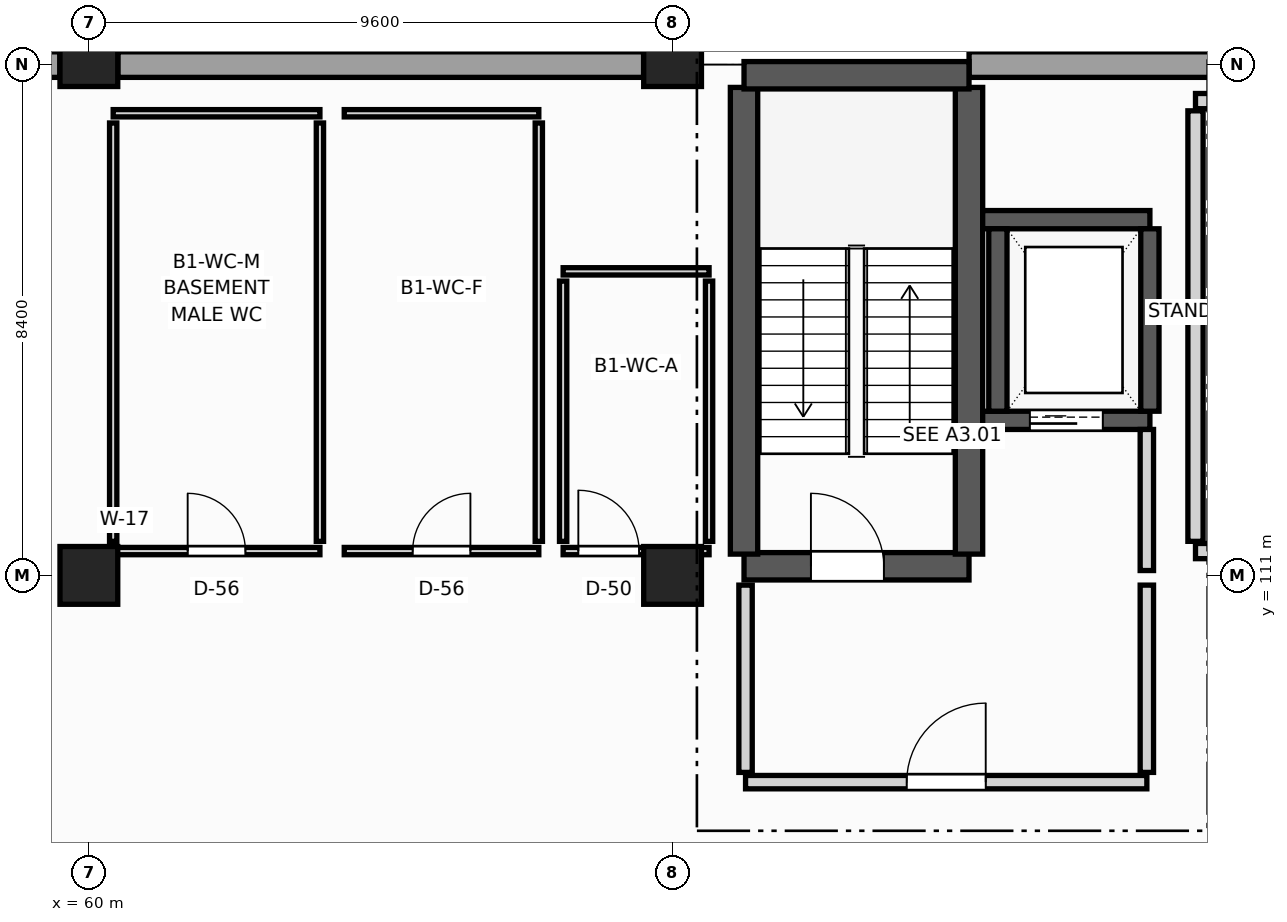
"""IFC4 building model, lengths in metres.
Left out: names, types, materials, properties, quantities, classifications, styles, units other than length and angle.
Written with IfcOpenShell. Run it as: python <this file> out.ifc"""

import sys

from ifc_helpers import new_model, si_unit, direction, frame, frame_2d, origin, origin_2d, place, context, subcontext, project, spatial, rectangle, extrude, element, fill, save


model = new_model("IFC4")
c1 = context("Model", 3, precision=1e-05, world=origin(), true_north=direction((0.0, 1.0)))
c2 = subcontext(c1, "Body", "Model", "MODEL_VIEW")
j1 = project(units=[si_unit("LENGTHUNIT", "METRE"), si_unit("PLANEANGLEUNIT", "RADIAN")], contexts=[c1])
p1 = place(None, origin())
s1 = spatial("IfcSite", under=j1, at=p1, CompositionType="ELEMENT")
p2 = place(p1, origin())
s2 = spatial("IfcBuilding", under=s1, at=p2, CompositionType="ELEMENT")
p3 = place(p2, frame((0.0, 0.0, -4.5)))
s3 = spatial("IfcBuildingStorey", under=s2, at=p3, CompositionType="ELEMENT", Elevation=-4.5)
p4 = place(p3, frame((60.0, 111.0, 0.0), z_axis=(0.0, 0.0, 1.0), x_axis=(1.0, 0.0, 0.0)))
e1 = element("IfcColumn", 1, at=p4, inside=s3, PredefinedType="COLUMN", context=c2, shape_type="SweptSolid", body=[
    extrude(rectangle(XDim=0.95, YDim=0.95, at=origin_2d()), origin(), (0.0, 0.0, 1.0), 4.14),
])
p5 = place(p3, frame((60.0, 119.4, 0.0), z_axis=(0.0, 0.0, 1.0), x_axis=(1.0, 0.0, 0.0)))
e2 = element("IfcColumn", 2, at=p5, inside=s3, PredefinedType="COLUMN", context=c2, shape_type="SweptSolid", body=[
    extrude(rectangle(XDim=0.95, YDim=0.72, at=origin_2d()), origin(), (0.0, 0.0, 1.0), 4.14),
])
p6 = place(p3, frame((69.6, 111.0, 0.0), z_axis=(0.0, 0.0, 1.0), x_axis=(1.0, 0.0, 0.0)))
e3 = element("IfcColumn", 3, at=p6, inside=s3, PredefinedType="COLUMN", context=c2, shape_type="SweptSolid", body=[
    extrude(rectangle(XDim=0.95, YDim=0.95, at=origin_2d()), origin(), (0.0, 0.0, 1.0), 4.14),
])
p7 = place(p3, frame((69.6, 119.4, 0.0), z_axis=(0.0, 0.0, 1.0), x_axis=(1.0, 0.0, 0.0)))
e4 = element("IfcColumn", 4, at=p7, inside=s3, PredefinedType="COLUMN", context=c2, shape_type="SweptSolid", body=[
    extrude(rectangle(XDim=0.95, YDim=0.72, at=origin_2d()), origin(), (0.0, 0.0, 1.0), 4.14),
])
for number, where, z_axis, x_axis in (
    (5, (50.877, 119.4, 0.0), (0.0, 0.0, 1.0), (1.0, 0.0, 0.0)),
    (6, (60.477, 119.4, 0.0), (0.0, 0.0, 1.0), (1.0, 0.0, 0.0)),
):
    element("IfcWall", number, at=place(p3, frame(where, z_axis=z_axis, x_axis=x_axis)), inside=s3, PredefinedType="SOLIDWALL", context=c2, shape_type="SweptSolid", body=[
        extrude(rectangle(XDim=8.646, YDim=0.42, at=frame_2d((4.323, 0.0))), origin(), (0.0, 0.0, 1.0), 4.135),
    ])
p8 = place(p3, frame((74.476, 119.4, 0.0), z_axis=(0.0, 0.0, 1.0), x_axis=(1.0, 0.0, 0.0)))
e7 = element("IfcWall", 7, at=p8, inside=s3, PredefinedType="SOLIDWALL", context=c2, shape_type="SweptSolid", body=[
    extrude(rectangle(XDim=4.247, YDim=0.42, at=frame_2d((2.124, 0.0))), origin(), (0.0, 0.0, 1.0), 4.135),
])
p9 = place(p3, frame((70.775, 111.15, 0.0), z_axis=(0.0, 0.0, 1.0), x_axis=(1.0, 0.0, 0.0)))
e8 = element("IfcWall", 8, at=p9, inside=s3, PredefinedType="SHEAR", context=c2, shape_type="SweptSolid", body=[
    extrude(rectangle(XDim=3.7, YDim=0.45, at=frame_2d((1.85, 0.0))), origin(), (0.0, 0.0, 1.0), 4.14),
])
p10 = place(p9, frame((1.1, 0.0, 0.0)))
e9 = element("IfcOpeningElement", 9, at=p10, cuts=e8, PredefinedType="OPENING", context=c2, shape_type="SweptSolid", body=[
    extrude(rectangle(XDim=1.2, YDim=2.2, at=frame_2d((0.6, 1.1))), frame((0.0, 0.235, 0.0), z_axis=(0.0, -1.0, 0.0), x_axis=(1.0, 0.0, 0.0)), (0.0, 0.0, 1.0), 0.47),
])
for number, where, z_axis, x_axis in (
    (10, (70.775, 111.35, 0.0), (0.0, 0.0, 1.0), (0.0, 1.0, 0.0)),
    (11, (74.475, 111.35, 0.0), (0.0, 0.0, 1.0), (0.0, 1.0, 0.0)),
):
    element("IfcWall", number, at=place(p3, frame(where, z_axis=z_axis, x_axis=x_axis)), inside=s3, PredefinedType="SHEAR", context=c2, shape_type="SweptSolid", body=[
        extrude(rectangle(XDim=7.675, YDim=0.45, at=frame_2d((3.837, 0.0))), origin(), (0.0, 0.0, 1.0), 4.14),
    ])
p11 = place(p3, frame((70.775, 119.225, 0.0), z_axis=(0.0, 0.0, 1.0), x_axis=(1.0, 0.0, 0.0)))
e12 = element("IfcWall", 12, at=p11, inside=s3, PredefinedType="SHEAR", context=c2, shape_type="SweptSolid", body=[
    extrude(rectangle(XDim=3.7, YDim=0.45, at=frame_2d((1.85, 0.0))), origin(), (0.0, 0.0, 1.0), 4.14),
])
p12 = place(p3, frame((74.7, 113.55, 0.0), z_axis=(0.0, 0.0, 1.0), x_axis=(1.0, 0.0, 0.0)))
e13 = element("IfcWall", 13, at=p12, inside=s3, PredefinedType="SHEAR", context=c2, shape_type="SweptSolid", body=[
    extrude(rectangle(XDim=2.75, YDim=0.3, at=frame_2d((1.375, 0.0))), origin(), (0.0, 0.0, 1.0), 4.14),
])
p13 = place(p12, frame((0.775, 0.0, 0.0)))
e14 = element("IfcOpeningElement", 14, at=p13, cuts=e13, PredefinedType="OPENING", context=c2, shape_type="SweptSolid", body=[
    extrude(rectangle(XDim=1.2, YDim=2.2, at=frame_2d((0.6, 1.1))), frame((0.0, 0.16, 0.0), z_axis=(0.0, -1.0, 0.0), x_axis=(1.0, 0.0, 0.0)), (0.0, 0.0, 1.0), 0.32),
])
p14 = place(p3, frame((74.7, 116.85, 0.0), z_axis=(0.0, 0.0, 1.0), x_axis=(1.0, 0.0, 0.0)))
e15 = element("IfcWall", 15, at=p14, inside=s3, PredefinedType="SHEAR", context=c2, shape_type="SweptSolid", body=[
    extrude(rectangle(XDim=2.75, YDim=0.3, at=frame_2d((1.375, 0.0))), origin(), (0.0, 0.0, 1.0), 4.14),
])
for number, where, z_axis, x_axis in (
    (16, (74.95, 113.7, 0.0), (0.0, 0.0, 1.0), (0.0, 1.0, 0.0)),
    (17, (77.45, 113.7, 0.0), (0.0, 0.0, 1.0), (0.0, 1.0, 0.0)),
):
    element("IfcWall", number, at=place(p3, frame(where, z_axis=z_axis, x_axis=x_axis)), inside=s3, PredefinedType="SHEAR", context=c2, shape_type="SweptSolid", body=[
        extrude(rectangle(XDim=3.0, YDim=0.3, at=frame_2d((1.5, 0.0))), origin(), (0.0, 0.0, 1.0), 4.14),
    ])
p15 = place(p3, frame((70.8, 107.6, 0.0), z_axis=(0.0, 0.0, 1.0), x_axis=(1.0, 0.0, 0.0)))
e18 = element("IfcWall", 18, at=p15, inside=s3, PredefinedType="PARTITIONING", context=c2, shape_type="SweptSolid", body=[
    extrude(rectangle(XDim=6.6, YDim=0.22, at=frame_2d((3.3, 0.0))), origin(), (0.0, 0.0, 1.0), 3.22),
])
p16 = place(p15, frame((2.65, 0.0, 0.0)))
e19 = element("IfcOpeningElement", 19, at=p16, cuts=e18, PredefinedType="OPENING", context=c2, shape_type="SweptSolid", body=[
    extrude(rectangle(XDim=1.3, YDim=2.2, at=frame_2d((0.65, 1.1))), frame((0.0, 0.12, 0.0), z_axis=(0.0, -1.0, 0.0), x_axis=(1.0, 0.0, 0.0)), (0.0, 0.0, 1.0), 0.24),
])
p17 = place(p3, frame((77.4, 111.08, 0.0), z_axis=(0.0, 0.0, 1.0), x_axis=(0.0, 1.0, 0.0)))
e20 = element("IfcWall", 20, at=p17, inside=s3, PredefinedType="PARTITIONING", context=c2, shape_type="SweptSolid", body=[
    extrude(rectangle(XDim=2.32, YDim=0.22, at=frame_2d((1.16, 0.0))), origin(), (0.0, 0.0, 1.0), 3.22),
])
for number, where, z_axis, x_axis in (
    (21, (70.8, 107.76, 0.0), (0.0, 0.0, 1.0), (0.0, 1.0, 0.0)),
    (22, (77.4, 107.76, 0.0), (0.0, 0.0, 1.0), (0.0, 1.0, 0.0)),
):
    element("IfcWall", number, at=place(p3, frame(where, z_axis=z_axis, x_axis=x_axis)), inside=s3, PredefinedType="PARTITIONING", context=c2, shape_type="SweptSolid", body=[
        extrude(rectangle(XDim=3.08, YDim=0.22, at=frame_2d((1.54, 0.0))), origin(), (0.0, 0.0, 1.0), 3.22),
    ])
p18 = place(p3, frame((78.2, 111.4, 0.0), z_axis=(0.0, 0.0, 1.0), x_axis=(1.0, 0.0, 0.0)))
e23 = element("IfcWall", 23, at=p18, inside=s3, PredefinedType="PARTITIONING", context=c2, shape_type="SweptSolid", body=[
    extrude(rectangle(XDim=12.4, YDim=0.25, at=frame_2d((6.2, 0.0))), origin(), (0.0, 0.0, 1.0), 3.22),
])
p19 = place(p18, frame((5.4, 0.0, 0.0)))
e24 = element("IfcOpeningElement", 24, at=p19, cuts=e23, PredefinedType="OPENING", context=c2, shape_type="SweptSolid", body=[
    extrude(rectangle(XDim=1.6, YDim=2.3, at=frame_2d((0.8, 1.15))), frame((0.0, 0.135, 0.0), z_axis=(0.0, -1.0, 0.0), x_axis=(1.0, 0.0, 0.0)), (0.0, 0.0, 1.0), 0.27),
])
p20 = place(p3, frame((78.2, 118.8, 0.0), z_axis=(0.0, 0.0, 1.0), x_axis=(1.0, 0.0, 0.0)))
e25 = element("IfcWall", 25, at=p20, inside=s3, PredefinedType="PARTITIONING", context=c2, shape_type="SweptSolid", body=[
    extrude(rectangle(XDim=12.4, YDim=0.25, at=frame_2d((6.2, 0.0))), origin(), (0.0, 0.0, 1.0), 3.22),
])
p21 = place(p3, frame((78.2, 111.56, 0.0), z_axis=(0.0, 0.0, 1.0), x_axis=(0.0, 1.0, 0.0)))
e26 = element("IfcWall", 26, at=p21, inside=s3, PredefinedType="PARTITIONING", context=c2, shape_type="SweptSolid", body=[
    extrude(rectangle(XDim=7.08, YDim=0.25, at=frame_2d((3.54, 0.0))), origin(), (0.0, 0.0, 1.0), 3.22),
])
p22 = place(p3, frame((60.4, 111.4, 0.0), z_axis=(0.0, 0.0, 1.0), x_axis=(1.0, 0.0, 0.0)))
e27 = element("IfcWall", 27, at=p22, inside=s3, PredefinedType="PARTITIONING", context=c2, shape_type="SweptSolid", body=[
    extrude(rectangle(XDim=3.4, YDim=0.12, at=frame_2d((1.7, 0.0))), origin(), (0.0, 0.0, 1.0), 3.22),
])
p23 = place(p22, frame((1.225, 0.0, 0.0)))
e28 = element("IfcOpeningElement", 28, at=p23, cuts=e27, PredefinedType="OPENING", context=c2, shape_type="SweptSolid", body=[
    extrude(rectangle(XDim=0.95, YDim=2.1, at=frame_2d((0.475, 1.05))), frame((0.0, 0.07, 0.0), z_axis=(0.0, -1.0, 0.0), x_axis=(1.0, 0.0, 0.0)), (0.0, 0.0, 1.0), 0.14),
])
p24 = place(p3, frame((60.4, 118.6, 0.0), z_axis=(0.0, 0.0, 1.0), x_axis=(1.0, 0.0, 0.0)))
e29 = element("IfcWall", 29, at=p24, inside=s3, PredefinedType="PARTITIONING", context=c2, shape_type="SweptSolid", body=[
    extrude(rectangle(XDim=3.4, YDim=0.12, at=frame_2d((1.7, 0.0))), origin(), (0.0, 0.0, 1.0), 3.22),
])
for number, where, z_axis, x_axis in (
    (30, (60.4, 111.56, 0.0), (0.0, 0.0, 1.0), (0.0, 1.0, 0.0)),
    (31, (63.8, 111.56, 0.0), (0.0, 0.0, 1.0), (0.0, 1.0, 0.0)),
):
    element("IfcWall", number, at=place(p3, frame(where, z_axis=z_axis, x_axis=x_axis)), inside=s3, PredefinedType="PARTITIONING", context=c2, shape_type="SweptSolid", body=[
        extrude(rectangle(XDim=6.88, YDim=0.12, at=frame_2d((3.44, 0.0))), origin(), (0.0, 0.0, 1.0), 3.22),
    ])
p25 = place(p3, frame((64.2, 111.4, 0.0), z_axis=(0.0, 0.0, 1.0), x_axis=(1.0, 0.0, 0.0)))
e32 = element("IfcWall", 32, at=p25, inside=s3, PredefinedType="PARTITIONING", context=c2, shape_type="SweptSolid", body=[
    extrude(rectangle(XDim=3.2, YDim=0.12, at=frame_2d((1.6, 0.0))), origin(), (0.0, 0.0, 1.0), 3.22),
])
p26 = place(p25, frame((1.125, 0.0, 0.0)))
e33 = element("IfcOpeningElement", 33, at=p26, cuts=e32, PredefinedType="OPENING", context=c2, shape_type="SweptSolid", body=[
    extrude(rectangle(XDim=0.95, YDim=2.1, at=frame_2d((0.475, 1.05))), frame((0.0, 0.07, 0.0), z_axis=(0.0, -1.0, 0.0), x_axis=(1.0, 0.0, 0.0)), (0.0, 0.0, 1.0), 0.14),
])
p27 = place(p3, frame((64.2, 118.6, 0.0), z_axis=(0.0, 0.0, 1.0), x_axis=(1.0, 0.0, 0.0)))
e34 = element("IfcWall", 34, at=p27, inside=s3, PredefinedType="PARTITIONING", context=c2, shape_type="SweptSolid", body=[
    extrude(rectangle(XDim=3.2, YDim=0.12, at=frame_2d((1.6, 0.0))), origin(), (0.0, 0.0, 1.0), 3.22),
])
p28 = place(p3, frame((67.4, 111.56, 0.0), z_axis=(0.0, 0.0, 1.0), x_axis=(0.0, 1.0, 0.0)))
e35 = element("IfcWall", 35, at=p28, inside=s3, PredefinedType="PARTITIONING", context=c2, shape_type="SweptSolid", body=[
    extrude(rectangle(XDim=6.88, YDim=0.12, at=frame_2d((3.44, 0.0))), origin(), (0.0, 0.0, 1.0), 3.22),
])
p29 = place(p3, frame((67.8, 111.4, 0.0), z_axis=(0.0, 0.0, 1.0), x_axis=(1.0, 0.0, 0.0)))
e36 = element("IfcWall", 36, at=p29, inside=s3, PredefinedType="PARTITIONING", context=c2, shape_type="SweptSolid", body=[
    extrude(rectangle(XDim=2.4, YDim=0.12, at=frame_2d((1.2, 0.0))), origin(), (0.0, 0.0, 1.0), 3.22),
])
p30 = place(p29, frame((0.25, 0.0, 0.0)))
e37 = element("IfcOpeningElement", 37, at=p30, cuts=e36, PredefinedType="OPENING", context=c2, shape_type="SweptSolid", body=[
    extrude(rectangle(XDim=1.0, YDim=2.15, at=frame_2d((0.5, 1.075))), frame((0.0, 0.07, 0.0), z_axis=(0.0, -1.0, 0.0), x_axis=(1.0, 0.0, 0.0)), (0.0, 0.0, 1.0), 0.14),
])
p31 = place(p3, frame((67.8, 116.0, 0.0), z_axis=(0.0, 0.0, 1.0), x_axis=(1.0, 0.0, 0.0)))
e38 = element("IfcWall", 38, at=p31, inside=s3, PredefinedType="PARTITIONING", context=c2, shape_type="SweptSolid", body=[
    extrude(rectangle(XDim=2.4, YDim=0.12, at=frame_2d((1.2, 0.0))), origin(), (0.0, 0.0, 1.0), 3.22),
])
for number, where, z_axis, x_axis in (
    (39, (67.8, 111.56, 0.0), (0.0, 0.0, 1.0), (0.0, 1.0, 0.0)),
    (40, (70.2, 111.56, 0.0), (0.0, 0.0, 1.0), (0.0, 1.0, 0.0)),
):
    element("IfcWall", number, at=place(p3, frame(where, z_axis=z_axis, x_axis=x_axis)), inside=s3, PredefinedType="PARTITIONING", context=c2, shape_type="SweptSolid", body=[
        extrude(rectangle(XDim=4.28, YDim=0.12, at=frame_2d((2.14, 0.0))), origin(), (0.0, 0.0, 1.0), 3.22),
    ])
p32 = place(p10, origin())
e41 = element("IfcDoor", 41, at=p32, inside=s3, OperationType="SINGLE_SWING_LEFT", PredefinedType="DOOR", context=c2, shape_type="SweptSolid", body=[
    extrude(rectangle(XDim=1.2, YDim=2.2, at=frame_2d((0.6, 1.1))), frame((0.0, 0.025, 0.0), z_axis=(0.0, -1.0, 0.0), x_axis=(1.0, 0.0, 0.0)), (0.0, 0.0, 1.0), 0.05),
])
fill(e9, e41)
p33 = place(p13, origin())
e42 = element("IfcDoor", 42, at=p33, inside=s3, OperationType="SLIDING_TO_LEFT", PredefinedType="DOOR", context=c2, shape_type="SweptSolid", body=[
    extrude(rectangle(XDim=1.2, YDim=2.2, at=frame_2d((0.6, 1.1))), frame((0.0, 0.025, 0.0), z_axis=(0.0, -1.0, 0.0), x_axis=(1.0, 0.0, 0.0)), (0.0, 0.0, 1.0), 0.05),
])
fill(e14, e42)
p34 = place(p16, origin())
e43 = element("IfcDoor", 43, at=p34, inside=s3, OperationType="SINGLE_SWING_RIGHT", PredefinedType="DOOR", context=c2, shape_type="SweptSolid", body=[
    extrude(rectangle(XDim=1.3, YDim=2.2, at=frame_2d((0.65, 1.1))), frame((0.0, 0.025, 0.0), z_axis=(0.0, -1.0, 0.0), x_axis=(1.0, 0.0, 0.0)), (0.0, 0.0, 1.0), 0.05),
])
fill(e19, e43)
p35 = place(p23, origin())
e44 = element("IfcDoor", 44, at=p35, inside=s3, OperationType="SINGLE_SWING_LEFT", PredefinedType="DOOR", context=c2, shape_type="SweptSolid", body=[
    extrude(rectangle(XDim=0.95, YDim=2.1, at=frame_2d((0.475, 1.05))), frame((0.0, 0.025, 0.0), z_axis=(0.0, -1.0, 0.0), x_axis=(1.0, 0.0, 0.0)), (0.0, 0.0, 1.0), 0.05),
])
fill(e28, e44)
p36 = place(p26, origin())
e45 = element("IfcDoor", 45, at=p36, inside=s3, OperationType="SINGLE_SWING_RIGHT", PredefinedType="DOOR", context=c2, shape_type="SweptSolid", body=[
    extrude(rectangle(XDim=0.95, YDim=2.1, at=frame_2d((0.475, 1.05))), frame((0.0, 0.025, 0.0), z_axis=(0.0, -1.0, 0.0), x_axis=(1.0, 0.0, 0.0)), (0.0, 0.0, 1.0), 0.05),
])
fill(e33, e45)
p37 = place(p30, origin())
e46 = element("IfcDoor", 46, at=p37, inside=s3, OperationType="SINGLE_SWING_LEFT", PredefinedType="DOOR", context=c2, shape_type="SweptSolid", body=[
    extrude(rectangle(XDim=1.0, YDim=2.15, at=frame_2d((0.5, 1.075))), frame((0.0, 0.025, 0.0), z_axis=(0.0, -1.0, 0.0), x_axis=(1.0, 0.0, 0.0)), (0.0, 0.0, 1.0), 0.05),
])
fill(e37, e46)
save(model, sys.argv[1])
